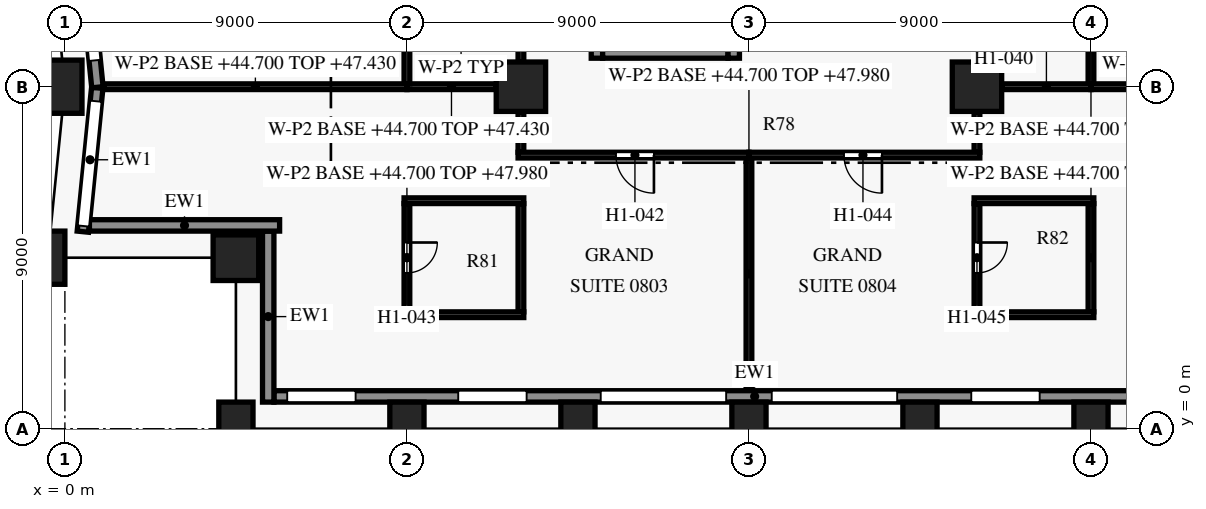
"""IFC4 building model, lengths in metres.
Left out: names, types, materials, properties, quantities, classifications, styles, units other than length and angle.
Written with IfcOpenShell. Run it as: python <this file> out.ifc"""

import sys

from ifc_helpers import new_model, si_unit, direction, frame, frame_2d, origin, origin_2d, place, context, subcontext, project, spatial, rectangle, extrude, element, fill, save


model = new_model("IFC4")
c1 = context("Model", 3, precision=1e-05, world=origin(), true_north=direction((0.0, 1.0)))
c2 = subcontext(c1, "Body", "Model", "MODEL_VIEW")
j1 = project(units=[si_unit("LENGTHUNIT", "METRE"), si_unit("PLANEANGLEUNIT", "RADIAN")], contexts=[c1])
p1 = place(None, origin())
s1 = spatial("IfcSite", under=j1, at=p1, CompositionType="ELEMENT")
p2 = place(p1, origin())
s2 = spatial("IfcBuilding", under=s1, at=p2, CompositionType="ELEMENT")
p3 = place(p2, frame((0.0, 0.0, 44.7)))
s3 = spatial("IfcBuildingStorey", under=s2, at=p3, CompositionType="ELEMENT", Elevation=44.7)
for number, where, z_axis, x_axis in (
    (1, (4.5, 0.0, 0.0), (0.0, 0.0, 1.0), (1.0, 0.0, 0.0)),
    (2, (9.0, 0.0, 0.0), (0.0, 0.0, 1.0), (1.0, 0.0, 0.0)),
    (3, (13.5, 0.0, 0.0), (0.0, 0.0, 1.0), (1.0, 0.0, 0.0)),
    (4, (18.0, 0.0, 0.0), (0.0, 0.0, 1.0), (1.0, 0.0, 0.0)),
    (5, (22.5, 0.0, 0.0), (0.0, 0.0, 1.0), (1.0, 0.0, 0.0)),
    (6, (27.0, 0.0, 0.0), (0.0, 0.0, 1.0), (1.0, 0.0, 0.0)),
    (7, (0.0, 9.0, 0.0), (0.0, 0.0, 1.0), (0.0, -1.0, 0.0)),
    (8, (-0.45, 4.5, 0.0), (0.0, 0.0, 1.0), (-0.1, -0.995, 0.0)),
):
    element("IfcColumn", number, at=place(p3, frame(where, z_axis=z_axis, x_axis=x_axis)), inside=s3, PredefinedType="COLUMN", context=c2, shape_type="SweptSolid", body=[
        extrude(rectangle(XDim=0.9, YDim=1.4, at=origin_2d()), origin(), (0.0, 0.0, 1.0), 3.6),
    ])
p4 = place(p3, frame((4.5, 4.5, 0.0), z_axis=(0.0, 0.0, 1.0), x_axis=(1.0, 0.0, 0.0)))
e9 = element("IfcColumn", 9, at=p4, inside=s3, PredefinedType="COLUMN", context=c2, shape_type="SweptSolid", body=[
    extrude(rectangle(XDim=1.2, YDim=1.2, at=origin_2d()), origin(), (0.0, 0.0, 1.0), 3.6),
])
for number, where, z_axis, x_axis in (
    (10, (12.0, 9.0, 0.0), (0.0, 0.0, 1.0), (1.0, 0.0, 0.0)),
    (11, (24.0, 9.0, 0.0), (0.0, 0.0, 1.0), (1.0, 0.0, 0.0)),
):
    element("IfcColumn", number, at=place(p3, frame(where, z_axis=z_axis, x_axis=x_axis)), inside=s3, PredefinedType="COLUMN", context=c2, shape_type="SweptSolid", body=[
        extrude(rectangle(XDim=1.3, YDim=1.3, at=origin_2d()), origin(), (0.0, 0.0, 1.0), 3.6),
    ])
p5 = place(p3, frame((30.8, 0.85, 0.0), z_axis=(0.0, 0.0, 1.0), x_axis=(-1.0, 0.0, 0.0)))
e12 = element("IfcWall", 12, at=p5, inside=s3, PredefinedType="SOLIDWALL", context=c2, shape_type="SweptSolid", body=[
    extrude(rectangle(XDim=25.3, YDim=0.3, at=frame_2d((12.65, 0.0))), origin(), (0.0, 0.0, 1.0), 2.95),
])
p6 = place(p5, frame((0.65, 0.0, 0.75)))
e13 = element("IfcOpeningElement", 13, at=p6, cuts=e12, PredefinedType="OPENING", context=c2, shape_type="SweptSolid", body=[
    extrude(rectangle(XDim=1.8, YDim=1.8, at=frame_2d((0.9, 0.9))), frame((0.0, 0.16, 0.0), z_axis=(0.0, -1.0, 0.0), x_axis=(1.0, 0.0, 0.0)), (0.0, 0.0, 1.0), 0.32),
])
p7 = place(p5, frame((5.15, 0.0, 0.75)))
e14 = element("IfcOpeningElement", 14, at=p7, cuts=e12, PredefinedType="OPENING", context=c2, shape_type="SweptSolid", body=[
    extrude(rectangle(XDim=1.8, YDim=1.8, at=frame_2d((0.9, 0.9))), frame((0.0, 0.16, 0.0), z_axis=(0.0, -1.0, 0.0), x_axis=(1.0, 0.0, 0.0)), (0.0, 0.0, 1.0), 0.32),
])
p8 = place(p5, frame((8.9, 0.0, 0.15)))
e15 = element("IfcOpeningElement", 15, at=p8, cuts=e12, PredefinedType="OPENING", context=c2, shape_type="SweptSolid", body=[
    extrude(rectangle(XDim=3.3, YDim=2.4, at=frame_2d((1.65, 1.2))), frame((0.0, 0.16, 0.0), z_axis=(0.0, -1.0, 0.0), x_axis=(1.0, 0.0, 0.0)), (0.0, 0.0, 1.0), 0.32),
])
p9 = place(p5, frame((13.4, 0.0, 0.15)))
e16 = element("IfcOpeningElement", 16, at=p9, cuts=e12, PredefinedType="OPENING", context=c2, shape_type="SweptSolid", body=[
    extrude(rectangle(XDim=3.3, YDim=2.4, at=frame_2d((1.65, 1.2))), frame((0.0, 0.16, 0.0), z_axis=(0.0, -1.0, 0.0), x_axis=(1.0, 0.0, 0.0)), (0.0, 0.0, 1.0), 0.32),
])
p10 = place(p5, frame((18.65, 0.0, 0.75)))
e17 = element("IfcOpeningElement", 17, at=p10, cuts=e12, PredefinedType="OPENING", context=c2, shape_type="SweptSolid", body=[
    extrude(rectangle(XDim=1.8, YDim=1.8, at=frame_2d((0.9, 0.9))), frame((0.0, 0.16, 0.0), z_axis=(0.0, -1.0, 0.0), x_axis=(1.0, 0.0, 0.0)), (0.0, 0.0, 1.0), 0.32),
])
p11 = place(p5, frame((23.15, 0.0, 0.75)))
e18 = element("IfcOpeningElement", 18, at=p11, cuts=e12, PredefinedType="OPENING", context=c2, shape_type="SweptSolid", body=[
    extrude(rectangle(XDim=1.8, YDim=1.8, at=frame_2d((0.9, 0.9))), frame((0.0, 0.16, 0.0), z_axis=(0.0, -1.0, 0.0), x_axis=(1.0, 0.0, 0.0)), (0.0, 0.0, 1.0), 0.32),
])
p12 = place(p3, frame((0.856, 8.985, 0.0), z_axis=(0.0, 0.0, 1.0), x_axis=(-0.099495688264, 0.995037993253, 0.0)))
e19 = element("IfcWall", 19, at=p12, inside=s3, PredefinedType="SOLIDWALL", context=c2, shape_type="SweptSolid", body=[
    extrude(rectangle(XDim=9.03, YDim=0.3, at=frame_2d((4.515, 0.0))), origin(), (0.0, 0.0, 1.0), 2.95),
])
p13 = place(p12, frame((0.711, 0.0, 0.15)))
e20 = element("IfcOpeningElement", 20, at=p13, cuts=e19, PredefinedType="OPENING", context=c2, shape_type="SweptSolid", body=[
    extrude(rectangle(XDim=3.3, YDim=2.4, at=frame_2d((1.65, 1.2))), frame((0.0, 0.16, 0.0), z_axis=(0.0, -1.0, 0.0), x_axis=(1.0, 0.0, 0.0)), (0.0, 0.0, 1.0), 0.32),
])
p14 = place(p12, frame((5.984, 0.0, 0.75)))
e21 = element("IfcOpeningElement", 21, at=p14, cuts=e19, PredefinedType="OPENING", context=c2, shape_type="SweptSolid", body=[
    extrude(rectangle(XDim=1.8, YDim=1.8, at=frame_2d((0.9, 0.9))), frame((0.0, 0.16, 0.0), z_axis=(0.0, -1.0, 0.0), x_axis=(1.0, 0.0, 0.0)), (0.0, 0.0, 1.0), 0.32),
])
p15 = place(p3, frame((0.473, 5.185, 0.0), z_axis=(0.0, 0.0, 1.0), x_axis=(0.099541845169, 0.995033376857, 0.0)))
e22 = element("IfcWall", 22, at=p15, inside=s3, PredefinedType="SOLIDWALL", context=c2, shape_type="SweptSolid", body=[
    extrude(rectangle(XDim=3.804, YDim=0.3, at=frame_2d((1.902, 0.0))), origin(), (0.0, 0.0, 1.0), 2.95),
])
p16 = place(p15, frame((0.15, 0.0, 0.15)))
e23 = element("IfcOpeningElement", 23, at=p16, cuts=e22, PredefinedType="OPENING", context=c2, shape_type="SweptSolid", body=[
    extrude(rectangle(XDim=3.3, YDim=2.4, at=frame_2d((1.65, 1.2))), frame((0.0, 0.16, 0.0), z_axis=(0.0, -1.0, 0.0), x_axis=(1.0, 0.0, 0.0)), (0.0, 0.0, 1.0), 0.32),
])
p17 = place(p3, frame((5.65, 5.35, 0.0), z_axis=(0.0, 0.0, 1.0), x_axis=(-1.0, 0.0, 0.0)))
e24 = element("IfcWall", 24, at=p17, inside=s3, PredefinedType="SOLIDWALL", context=c2, shape_type="SweptSolid", body=[
    extrude(rectangle(XDim=5.005, YDim=0.3, at=frame_2d((2.502, 0.0))), origin(), (0.0, 0.0, 1.0), 2.95),
])
p18 = place(p3, frame((5.35, 0.7, 0.0), z_axis=(0.0, 0.0, 1.0), x_axis=(0.0, 1.0, 0.0)))
e25 = element("IfcWall", 25, at=p18, inside=s3, PredefinedType="SOLIDWALL", context=c2, shape_type="SweptSolid", body=[
    extrude(rectangle(XDim=4.5, YDim=0.3, at=frame_2d((2.25, 0.0))), origin(), (0.0, 0.0, 1.0), 2.95),
])
p19 = place(p3, frame((14.15, 9.9, 0.0), z_axis=(0.0, 0.0, 1.0), x_axis=(1.0, 0.0, 0.0)))
e26 = element("IfcWall", 26, at=p19, inside=s3, PredefinedType="SHEAR", context=c2, shape_type="SweptSolid", body=[
    extrude(rectangle(XDim=3.3, YDim=0.3, at=frame_2d((1.65, 0.0))), origin(), (0.0, 0.0, 1.0), 3.3),
])
p20 = place(p3, frame((14.0, 9.75, 0.0), z_axis=(0.0, 0.0, 1.0), x_axis=(0.0, 1.0, 0.0)))
e27 = element("IfcWall", 27, at=p20, inside=s3, PredefinedType="SHEAR", context=c2, shape_type="SweptSolid", body=[
    extrude(rectangle(XDim=8.3, YDim=0.3, at=frame_2d((4.15, 0.0))), origin(), (0.0, 0.0, 1.0), 3.3),
])
p21 = place(p3, frame((17.6, 9.75, 0.0), z_axis=(0.0, 0.0, 1.0), x_axis=(0.0, 1.0, 0.0)))
e28 = element("IfcWall", 28, at=p21, inside=s3, PredefinedType="SHEAR", context=c2, shape_type="SweptSolid", body=[
    extrude(rectangle(XDim=8.3, YDim=0.3, at=frame_2d((4.15, 0.0))), origin(), (0.0, 0.0, 1.0), 3.3),
])
p22 = place(p21, frame((0.65, 0.0, 0.0)))
e29 = element("IfcOpeningElement", 29, at=p22, cuts=e28, PredefinedType="OPENING", context=c2, shape_type="SweptSolid", body=[
    extrude(rectangle(XDim=1.2, YDim=2.2, at=frame_2d((0.6, 1.1))), frame((0.0, 0.16, 0.0), z_axis=(0.0, -1.0, 0.0), x_axis=(1.0, 0.0, 0.0)), (0.0, 0.0, 1.0), 0.32),
])
for number, where, z_axis, x_axis in (
    (30, (8.925, 3.0, 0.0), (0.0, 0.0, 1.0), (1.0, 0.0, 0.0)),
    (31, (23.925, 3.0, 0.0), (0.0, 0.0, 1.0), (1.0, 0.0, 0.0)),
):
    element("IfcWall", number, at=place(p3, frame(where, z_axis=z_axis, x_axis=x_axis)), inside=s3, PredefinedType="PARTITIONING", context=c2, shape_type="SweptSolid", body=[
        extrude(rectangle(XDim=3.15, YDim=0.15, at=frame_2d((1.575, 0.0))), origin(), (0.0, 0.0, 1.0), 2.58),
    ])
p23 = place(p3, frame((12.0, 3.075, 0.0), z_axis=(0.0, 0.0, 1.0), x_axis=(0.0, 1.0, 0.0)))
e32 = element("IfcWall", 32, at=p23, inside=s3, PredefinedType="PARTITIONING", context=c2, shape_type="SweptSolid", body=[
    extrude(rectangle(XDim=2.85, YDim=0.15, at=frame_2d((1.425, 0.0))), origin(), (0.0, 0.0, 1.0), 2.58),
])
p24 = place(p3, frame((27.0, 3.075, 0.0), z_axis=(0.0, 0.0, 1.0), x_axis=(0.0, 1.0, 0.0)))
e33 = element("IfcWall", 33, at=p24, inside=s3, PredefinedType="PARTITIONING", context=c2, shape_type="SweptSolid", body=[
    extrude(rectangle(XDim=2.85, YDim=0.15, at=frame_2d((1.425, 0.0))), origin(), (0.0, 0.0, 1.0), 3.28),
])
p25 = place(p3, frame((9.0, 5.925, 0.0), z_axis=(0.0, 0.0, 1.0), x_axis=(0.0, -1.0, 0.0)))
e34 = element("IfcWall", 34, at=p25, inside=s3, PredefinedType="PARTITIONING", context=c2, shape_type="SweptSolid", body=[
    extrude(rectangle(XDim=2.85, YDim=0.15, at=frame_2d((1.425, 0.0))), origin(), (0.0, 0.0, 1.0), 3.28),
])
p26 = place(p25, frame((1.025, 0.0, 0.0)))
e35 = element("IfcOpeningElement", 35, at=p26, cuts=e34, PredefinedType="OPENING", context=c2, shape_type="SweptSolid", body=[
    extrude(rectangle(XDim=0.8, YDim=2.1, at=frame_2d((0.4, 1.05))), frame((0.0, 0.085, 0.0), z_axis=(0.0, -1.0, 0.0), x_axis=(1.0, 0.0, 0.0)), (0.0, 0.0, 1.0), 0.17),
])
p27 = place(p3, frame((24.0, 5.925, 0.0), z_axis=(0.0, 0.0, 1.0), x_axis=(0.0, -1.0, 0.0)))
e36 = element("IfcWall", 36, at=p27, inside=s3, PredefinedType="PARTITIONING", context=c2, shape_type="SweptSolid", body=[
    extrude(rectangle(XDim=2.85, YDim=0.15, at=frame_2d((1.425, 0.0))), origin(), (0.0, 0.0, 1.0), 2.58),
])
p28 = place(p27, frame((1.025, 0.0, 0.0)))
e37 = element("IfcOpeningElement", 37, at=p28, cuts=e36, PredefinedType="OPENING", context=c2, shape_type="SweptSolid", body=[
    extrude(rectangle(XDim=0.8, YDim=2.1, at=frame_2d((0.4, 1.05))), frame((0.0, 0.085, 0.0), z_axis=(0.0, -1.0, 0.0), x_axis=(1.0, 0.0, 0.0)), (0.0, 0.0, 1.0), 0.17),
])
for number, where, z_axis, x_axis in (
    (38, (12.075, 6.0, 0.0), (0.0, 0.0, 1.0), (-1.0, 0.0, 0.0)),
    (39, (27.075, 6.0, 0.0), (0.0, 0.0, 1.0), (-1.0, 0.0, 0.0)),
):
    element("IfcWall", number, at=place(p3, frame(where, z_axis=z_axis, x_axis=x_axis)), inside=s3, PredefinedType="PARTITIONING", context=c2, shape_type="SweptSolid", body=[
        extrude(rectangle(XDim=3.15, YDim=0.15, at=frame_2d((1.575, 0.0))), origin(), (0.0, 0.0, 1.0), 2.58),
    ])
p29 = place(p3, frame((18.0, 7.125, 0.0), z_axis=(0.0, 0.0, 1.0), x_axis=(0.0, -1.0, 0.0)))
e40 = element("IfcWall", 40, at=p29, inside=s3, PredefinedType="PARTITIONING", context=c2, shape_type="SweptSolid", body=[
    extrude(rectangle(XDim=6.105, YDim=0.15, at=frame_2d((3.052, 0.0))), origin(), (0.0, 0.0, 1.0), 3.28),
])
p30 = place(p3, frame((18.0, 7.2, 0.0), z_axis=(0.0, 0.0, 1.0), x_axis=(-1.0, 0.0, 0.0)))
e41 = element("IfcWall", 41, at=p30, inside=s3, PredefinedType="PARTITIONING", context=c2, shape_type="SweptSolid", body=[
    extrude(rectangle(XDim=6.075, YDim=0.15, at=frame_2d((3.038, 0.0))), origin(), (0.0, 0.0, 1.0), 2.58),
])
p31 = place(p30, frame((2.5, 0.0, 0.0)))
e42 = element("IfcOpeningElement", 42, at=p31, cuts=e41, PredefinedType="OPENING", context=c2, shape_type="SweptSolid", body=[
    extrude(rectangle(XDim=1.0, YDim=2.1, at=frame_2d((0.5, 1.05))), frame((0.0, 0.085, 0.0), z_axis=(0.0, -1.0, 0.0), x_axis=(1.0, 0.0, 0.0)), (0.0, 0.0, 1.0), 0.17),
])
p32 = place(p3, frame((24.075, 7.2, 0.0), z_axis=(0.0, 0.0, 1.0), x_axis=(-1.0, 0.0, 0.0)))
e43 = element("IfcWall", 43, at=p32, inside=s3, PredefinedType="PARTITIONING", context=c2, shape_type="SweptSolid", body=[
    extrude(rectangle(XDim=6.075, YDim=0.15, at=frame_2d((3.038, 0.0))), origin(), (0.0, 0.0, 1.0), 2.58),
])
p33 = place(p32, frame((2.575, 0.0, 0.0)))
e44 = element("IfcOpeningElement", 44, at=p33, cuts=e43, PredefinedType="OPENING", context=c2, shape_type="SweptSolid", body=[
    extrude(rectangle(XDim=1.0, YDim=2.1, at=frame_2d((0.5, 1.05))), frame((0.0, 0.085, 0.0), z_axis=(0.0, -1.0, 0.0), x_axis=(1.0, 0.0, 0.0)), (0.0, 0.0, 1.0), 0.17),
])
for number, where, z_axis, x_axis in (
    (45, (12.0, 7.275, 0.0), (0.0, 0.0, 1.0), (0.0, 1.0, 0.0)),
    (46, (24.0, 8.345, 0.0), (0.0, 0.0, 1.0), (0.0, -1.0, 0.0)),
):
    element("IfcWall", number, at=place(p3, frame(where, z_axis=z_axis, x_axis=x_axis)), inside=s3, PredefinedType="PARTITIONING", context=c2, shape_type="SweptSolid", body=[
        extrude(rectangle(XDim=1.07, YDim=0.15, at=frame_2d((0.535, 0.0))), origin(), (0.0, 0.0, 1.0), 2.58),
    ])
p34 = place(p3, frame((9.0, 9.0, 0.0), z_axis=(0.0, 0.0, 1.0), x_axis=(-1.0, 0.0, 0.0)))
e47 = element("IfcWall", 47, at=p34, inside=s3, PredefinedType="PARTITIONING", context=c2, shape_type="SweptSolid", body=[
    extrude(rectangle(XDim=7.975, YDim=0.15, at=frame_2d((3.988, 0.0))), origin(), (0.0, 0.0, 1.0), 2.73),
])
for number, where, z_axis, x_axis in (
    (48, (11.345, 9.0, 0.0), (0.0, 0.0, 1.0), (-1.0, 0.0, 0.0)),
    (49, (27.0, 9.0, 0.0), (0.0, 0.0, 1.0), (-1.0, 0.0, 0.0)),
):
    element("IfcWall", number, at=place(p3, frame(where, z_axis=z_axis, x_axis=x_axis)), inside=s3, PredefinedType="PARTITIONING", context=c2, shape_type="SweptSolid", body=[
        extrude(rectangle(XDim=2.345, YDim=0.15, at=frame_2d((1.172, 0.0))), origin(), (0.0, 0.0, 1.0), 2.73),
    ])
p35 = place(p3, frame((34.975, 9.0, 0.0), z_axis=(0.0, 0.0, 1.0), x_axis=(-1.0, 0.0, 0.0)))
e50 = element("IfcWall", 50, at=p35, inside=s3, PredefinedType="PARTITIONING", context=c2, shape_type="SweptSolid", body=[
    extrude(rectangle(XDim=7.975, YDim=0.15, at=frame_2d((3.988, 0.0))), origin(), (0.0, 0.0, 1.0), 2.73),
])
p36 = place(p3, frame((27.0, 9.075, 0.0), z_axis=(0.0, 0.0, 1.0), x_axis=(0.0, 1.0, 0.0)))
e51 = element("IfcWall", 51, at=p36, inside=s3, PredefinedType="PARTITIONING", context=c2, shape_type="SweptSolid", body=[
    extrude(rectangle(XDim=1.95, YDim=0.15, at=frame_2d((0.975, 0.0))), origin(), (0.0, 0.0, 1.0), 2.73),
])
p37 = place(p3, frame((12.0, 9.655, 0.0), z_axis=(0.0, 0.0, 1.0), x_axis=(0.0, 1.0, 0.0)))
e52 = element("IfcWall", 52, at=p37, inside=s3, PredefinedType="PARTITIONING", context=c2, shape_type="SweptSolid", body=[
    extrude(rectangle(XDim=1.37, YDim=0.15, at=frame_2d((0.685, 0.0))), origin(), (0.0, 0.0, 1.0), 2.58),
])
p38 = place(p3, frame((9.0, 11.025, 0.0), z_axis=(0.0, 0.0, 1.0), x_axis=(0.0, -1.0, 0.0)))
e53 = element("IfcWall", 53, at=p38, inside=s3, PredefinedType="PARTITIONING", context=c2, shape_type="SweptSolid", body=[
    extrude(rectangle(XDim=1.95, YDim=0.15, at=frame_2d((0.975, 0.0))), origin(), (0.0, 0.0, 1.0), 2.73),
])
p39 = place(p3, frame((24.0, 11.025, 0.0), z_axis=(0.0, 0.0, 1.0), x_axis=(0.0, -1.0, 0.0)))
e54 = element("IfcWall", 54, at=p39, inside=s3, PredefinedType="PARTITIONING", context=c2, shape_type="SweptSolid", body=[
    extrude(rectangle(XDim=1.37, YDim=0.15, at=frame_2d((0.685, 0.0))), origin(), (0.0, 0.0, 1.0), 2.58),
])
p40 = place(p7, origin())
e55 = element("IfcWindow", 55, at=p40, inside=s3, PartitioningType="SINGLE_PANEL", PredefinedType="WINDOW", context=c2, shape_type="SweptSolid", body=[
    extrude(rectangle(XDim=1.8, YDim=1.8, at=frame_2d((0.9, 0.9))), frame((0.0, 0.03, 0.0), z_axis=(0.0, -1.0, 0.0), x_axis=(1.0, 0.0, 0.0)), (0.0, 0.0, 1.0), 0.06),
])
fill(e14, e55)
p41 = place(p8, origin())
e56 = element("IfcWindow", 56, at=p41, inside=s3, PartitioningType="SINGLE_PANEL", PredefinedType="WINDOW", context=c2, shape_type="SweptSolid", body=[
    extrude(rectangle(XDim=3.3, YDim=2.4, at=frame_2d((1.65, 1.2))), frame((0.0, 0.03, 0.0), z_axis=(0.0, -1.0, 0.0), x_axis=(1.0, 0.0, 0.0)), (0.0, 0.0, 1.0), 0.06),
])
fill(e15, e56)
p42 = place(p9, origin())
e57 = element("IfcWindow", 57, at=p42, inside=s3, PartitioningType="SINGLE_PANEL", PredefinedType="WINDOW", context=c2, shape_type="SweptSolid", body=[
    extrude(rectangle(XDim=3.3, YDim=2.4, at=frame_2d((1.65, 1.2))), frame((0.0, 0.03, 0.0), z_axis=(0.0, -1.0, 0.0), x_axis=(1.0, 0.0, 0.0)), (0.0, 0.0, 1.0), 0.06),
])
fill(e16, e57)
p43 = place(p10, origin())
e58 = element("IfcWindow", 58, at=p43, inside=s3, PartitioningType="SINGLE_PANEL", PredefinedType="WINDOW", context=c2, shape_type="SweptSolid", body=[
    extrude(rectangle(XDim=1.8, YDim=1.8, at=frame_2d((0.9, 0.9))), frame((0.0, 0.03, 0.0), z_axis=(0.0, -1.0, 0.0), x_axis=(1.0, 0.0, 0.0)), (0.0, 0.0, 1.0), 0.06),
])
fill(e17, e58)
p44 = place(p11, origin())
e59 = element("IfcWindow", 59, at=p44, inside=s3, PartitioningType="SINGLE_PANEL", PredefinedType="WINDOW", context=c2, shape_type="SweptSolid", body=[
    extrude(rectangle(XDim=1.8, YDim=1.8, at=frame_2d((0.9, 0.9))), frame((0.0, 0.03, 0.0), z_axis=(0.0, -1.0, 0.0), x_axis=(1.0, 0.0, 0.0)), (0.0, 0.0, 1.0), 0.06),
])
fill(e18, e59)
p45 = place(p13, origin())
e60 = element("IfcWindow", 60, at=p45, inside=s3, PartitioningType="SINGLE_PANEL", PredefinedType="WINDOW", context=c2, shape_type="SweptSolid", body=[
    extrude(rectangle(XDim=3.3, YDim=2.4, at=frame_2d((1.65, 1.2))), frame((0.0, 0.03, 0.0), z_axis=(0.0, -1.0, 0.0), x_axis=(1.0, 0.0, 0.0)), (0.0, 0.0, 1.0), 0.06),
])
fill(e20, e60)
p46 = place(p16, origin())
e61 = element("IfcWindow", 61, at=p46, inside=s3, PartitioningType="SINGLE_PANEL", PredefinedType="WINDOW", context=c2, shape_type="SweptSolid", body=[
    extrude(rectangle(XDim=3.3, YDim=2.4, at=frame_2d((1.65, 1.2))), frame((0.0, 0.03, 0.0), z_axis=(0.0, -1.0, 0.0), x_axis=(1.0, 0.0, 0.0)), (0.0, 0.0, 1.0), 0.06),
])
fill(e23, e61)
p47 = place(p31, origin())
e62 = element("IfcDoor", 62, at=p47, inside=s3, OperationType="SINGLE_SWING_LEFT", PredefinedType="DOOR", context=c2, shape_type="SweptSolid", body=[
    extrude(rectangle(XDim=1.0, YDim=2.1, at=frame_2d((0.5, 1.05))), frame((0.0, 0.025, 0.0), z_axis=(0.0, -1.0, 0.0), x_axis=(1.0, 0.0, 0.0)), (0.0, 0.0, 1.0), 0.05),
])
fill(e42, e62)
p48 = place(p26, origin())
e63 = element("IfcDoor", 63, at=p48, inside=s3, OperationType="SINGLE_SWING_RIGHT", PredefinedType="DOOR", context=c2, shape_type="SweptSolid", body=[
    extrude(rectangle(XDim=0.8, YDim=2.1, at=frame_2d((0.4, 1.05))), frame((0.0, 0.025, 0.0), z_axis=(0.0, -1.0, 0.0), x_axis=(1.0, 0.0, 0.0)), (0.0, 0.0, 1.0), 0.05),
])
fill(e35, e63)
p49 = place(p33, origin())
e64 = element("IfcDoor", 64, at=p49, inside=s3, OperationType="SINGLE_SWING_LEFT", PredefinedType="DOOR", context=c2, shape_type="SweptSolid", body=[
    extrude(rectangle(XDim=1.0, YDim=2.1, at=frame_2d((0.5, 1.05))), frame((0.0, 0.025, 0.0), z_axis=(0.0, -1.0, 0.0), x_axis=(1.0, 0.0, 0.0)), (0.0, 0.0, 1.0), 0.05),
])
fill(e44, e64)
p50 = place(p28, origin())
e65 = element("IfcDoor", 65, at=p50, inside=s3, OperationType="SINGLE_SWING_RIGHT", PredefinedType="DOOR", context=c2, shape_type="SweptSolid", body=[
    extrude(rectangle(XDim=0.8, YDim=2.1, at=frame_2d((0.4, 1.05))), frame((0.0, 0.025, 0.0), z_axis=(0.0, -1.0, 0.0), x_axis=(1.0, 0.0, 0.0)), (0.0, 0.0, 1.0), 0.05),
])
fill(e37, e65)
save(model, sys.argv[1])
